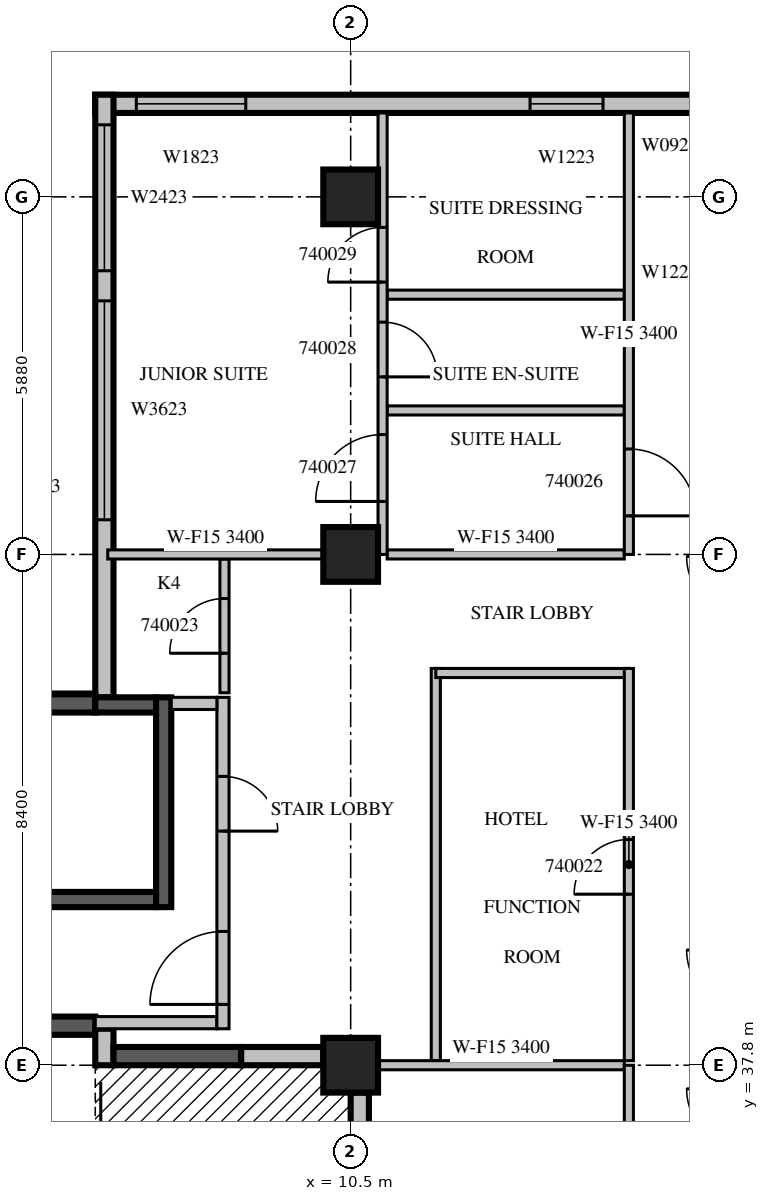
"""IFC4 building model, lengths in metres.
Left out: names, types, materials, properties, quantities, classifications, styles, units other than length and angle.
Written with IfcOpenShell. Run it as: python <this file> out.ifc"""

import sys

from ifc_helpers import new_model, si_unit, direction, frame, frame_2d, origin, origin_2d, place, context, subcontext, project, spatial, rectangle, extrude, source, transform, mapped, element, fill, save


model = new_model("IFC4")
c1 = context("Model", 3, precision=1e-05, world=origin(), true_north=direction((0.0, 1.0)))
c2 = subcontext(c1, "Body", "Model", "MODEL_VIEW")
j1 = project(units=[si_unit("LENGTHUNIT", "METRE"), si_unit("PLANEANGLEUNIT", "RADIAN")], contexts=[c1])
p1 = place(None, origin())
s1 = spatial("IfcSite", under=j1, at=p1, CompositionType="ELEMENT")
p2 = place(p1, origin())
s2 = spatial("IfcBuilding", under=s1, at=p2, CompositionType="ELEMENT")
p3 = place(p2, frame((0.0, 0.0, 185.4)))
s3 = spatial("IfcBuildingStorey", under=s2, at=p3, CompositionType="ELEMENT", Elevation=185.4)
m1 = source(origin(), c2, "Body", "SweptSolid", [
    extrude(rectangle(XDim=0.9, YDim=0.9, at=origin_2d()), origin(), (0.0, 0.0, 1.0), 3.8),
])
for number, where, z_axis, x_axis in (
    (1, (10.5, 37.8, 0.0), (0.0, 0.0, 1.0), (1.0, 0.0, 0.0)),
    (2, (10.5, 46.2, 0.0), (0.0, 0.0, 1.0), (1.0, 0.0, 0.0)),
    (3, (10.5, 52.08, 0.0), (0.0, 0.0, 1.0), (1.0, 0.0, 0.0)),
):
    element("IfcColumn", number, at=place(p3, frame(where, z_axis=z_axis, x_axis=x_axis)), inside=s3, PredefinedType="COLUMN", context=c2, shape_type="MappedRepresentation", body=[
        mapped(m1, transform((0.0, 0.0, 0.0), scale=1.0)),
    ])
m2 = source(origin(), c2, "Body", "SweptSolid", [
    extrude(rectangle(XDim=10.5, YDim=0.3, at=frame_2d((5.25, 0.0))), origin(), (0.0, 0.0, 1.0), 3.4),
])
p4 = place(p3, frame((16.8, 53.61, 0.0), z_axis=(0.0, 0.0, 1.0), x_axis=(-1.0, 0.0, 0.0)))
e4 = element("IfcWall", 4, at=p4, inside=s3, PredefinedType="STANDARD", context=c2, shape_type="MappedRepresentation", body=[
    mapped(m2, transform((0.0, 0.0, 0.0), scale=1.0)),
])
m3 = source(origin(), c2, "Body", "SweptSolid", [
    extrude(rectangle(XDim=1.2, YDim=2.3, at=frame_2d((0.6, 1.15))), frame((0.0, 0.16, 0.0), z_axis=(0.0, -1.0, 0.0), x_axis=(1.0, 0.0, 0.0)), (0.0, 0.0, 1.0), 0.32),
])
p5 = place(p4, frame((2.15, 0.0, 0.6)))
e5 = element("IfcOpeningElement", 5, at=p5, cuts=e4, PredefinedType="OPENING", context=c2, shape_type="MappedRepresentation", body=[
    mapped(m3, transform((0.0, 0.0, 0.0), scale=1.0)),
])
m4 = source(origin(), c2, "Body", "SweptSolid", [
    extrude(rectangle(XDim=1.8, YDim=2.3, at=frame_2d((0.9, 1.15))), frame((0.0, 0.16, 0.0), z_axis=(0.0, -1.0, 0.0), x_axis=(1.0, 0.0, 0.0)), (0.0, 0.0, 1.0), 0.32),
])
p6 = place(p4, frame((8.025, 0.0, 0.6)))
e6 = element("IfcOpeningElement", 6, at=p6, cuts=e4, PredefinedType="OPENING", context=c2, shape_type="MappedRepresentation", body=[
    mapped(m4, transform((0.0, 0.0, 0.0), scale=1.0)),
])
m5 = source(origin(), c2, "Body", "SweptSolid", [
    extrude(rectangle(XDim=9.91, YDim=0.3, at=frame_2d((4.955, 0.0))), origin(), (0.0, 0.0, 1.0), 3.4),
])
p7 = place(p3, frame((6.45, 53.76, 0.0), z_axis=(0.0, 0.0, 1.0), x_axis=(0.0, -1.0, 0.0)))
e7 = element("IfcWall", 7, at=p7, inside=s3, PredefinedType="STANDARD", context=c2, shape_type="MappedRepresentation", body=[
    mapped(m5, transform((0.0, 0.0, 0.0), scale=1.0)),
])
m6 = source(origin(), c2, "Body", "SweptSolid", [
    extrude(rectangle(XDim=3.6, YDim=2.3, at=frame_2d((1.8, 1.15))), frame((0.0, 0.16, 0.0), z_axis=(0.0, -1.0, 0.0), x_axis=(1.0, 0.0, 0.0)), (0.0, 0.0, 1.0), 0.32),
])
p8 = place(p7, frame((3.39, 0.0, 0.6)))
e8 = element("IfcOpeningElement", 8, at=p8, cuts=e7, PredefinedType="OPENING", context=c2, shape_type="MappedRepresentation", body=[
    mapped(m6, transform((0.0, 0.0, 0.0), scale=1.0)),
])
m7 = source(origin(), c2, "Body", "SweptSolid", [
    extrude(rectangle(XDim=2.4, YDim=2.3, at=frame_2d((1.2, 1.15))), frame((0.0, 0.16, 0.0), z_axis=(0.0, -1.0, 0.0), x_axis=(1.0, 0.0, 0.0)), (0.0, 0.0, 1.0), 0.32),
])
p9 = place(p7, frame((0.495, 0.0, 0.6)))
e9 = element("IfcOpeningElement", 9, at=p9, cuts=e7, PredefinedType="OPENING", context=c2, shape_type="MappedRepresentation", body=[
    mapped(m7, transform((0.0, 0.0, 0.0), scale=1.0)),
])
m8 = source(origin(), c2, "Body", "SweptSolid", [
    extrude(rectangle(XDim=6.1, YDim=0.3, at=frame_2d((3.05, 0.0))), origin(), (0.0, 0.0, 1.0), 3.4),
])
for number, where, z_axis, x_axis in (
    (10, (6.3, 43.75, 0.0), (0.0, 0.0, 1.0), (-1.0, 0.0, 0.0)),
    (11, (0.2, 38.45, 0.0), (0.0, 0.0, 1.0), (1.0, 0.0, 0.0)),
):
    element("IfcWall", number, at=place(p3, frame(where, z_axis=z_axis, x_axis=x_axis)), inside=s3, PredefinedType="SOLIDWALL", context=c2, shape_type="MappedRepresentation", body=[
        mapped(m8, transform((0.0, 0.0, 0.0), scale=1.0)),
    ])
m9 = source(origin(), c2, "Body", "SweptSolid", [
    extrude(rectangle(XDim=0.6, YDim=0.3, at=frame_2d((0.3, 0.0))), origin(), (0.0, 0.0, 1.0), 3.4),
])
p10 = place(p3, frame((6.45, 38.4, 0.0), z_axis=(0.0, 0.0, 1.0), x_axis=(0.0, -1.0, 0.0)))
e12 = element("IfcWall", 12, at=p10, inside=s3, PredefinedType="STANDARD", context=c2, shape_type="MappedRepresentation", body=[
    mapped(m9, transform((0.0, 0.0, 0.0), scale=1.0)),
])
p11 = place(p3, frame((6.6, 37.95, 0.0), z_axis=(0.0, 0.0, 1.0), x_axis=(1.0, 0.0, 0.0)))
e13 = element("IfcWall", 13, at=p11, inside=s3, PredefinedType="SOLIDWALL", context=c2, shape_type="SweptSolid", body=[
    extrude(rectangle(XDim=2.1, YDim=0.3, at=frame_2d((1.05, 0.0))), origin(), (0.0, 0.0, 1.0), 3.4),
])
p12 = place(p3, frame((8.7, 37.95, 0.0), z_axis=(0.0, 0.0, 1.0), x_axis=(1.0, 0.0, 0.0)))
e14 = element("IfcWall", 14, at=p12, inside=s3, PredefinedType="STANDARD", context=c2, shape_type="SweptSolid", body=[
    extrude(rectangle(XDim=1.35, YDim=0.3, at=frame_2d((0.675, 0.0))), origin(), (0.0, 0.0, 1.0), 3.4),
])
p13 = place(p3, frame((10.65, 37.35, 0.0), z_axis=(0.0, 0.0, 1.0), x_axis=(0.0, -1.0, 0.0)))
e15 = element("IfcWall", 15, at=p13, inside=s3, PredefinedType="STANDARD", context=c2, shape_type="SweptSolid", body=[
    extrude(rectangle(XDim=7.5, YDim=0.3, at=frame_2d((3.75, 0.0))), origin(), (0.0, 0.0, 1.0), 2.4),
])
m10 = source(origin(), c2, "Body", "SweptSolid", [
    extrude(rectangle(XDim=1.8, YDim=2.4, at=frame_2d((0.9, 1.2))), frame((0.0, 0.16, 0.0), z_axis=(0.0, -1.0, 0.0), x_axis=(1.0, 0.0, 0.0)), (0.0, 0.0, 1.0), 0.32),
])
p14 = place(p13, frame((4.5, 0.0, 0.0)))
e16 = element("IfcOpeningElement", 16, at=p14, cuts=e15, PredefinedType="OPENING", context=c2, shape_type="MappedRepresentation", body=[
    mapped(m10, transform((0.0, 0.0, 0.0), scale=1.0)),
])
m11 = source(origin(), c2, "Body", "SweptSolid", [
    extrude(rectangle(XDim=7.0, YDim=0.25, at=frame_2d((3.5, 0.0))), origin(), (0.0, 0.0, 1.0), 3.4),
])
p15 = place(p3, frame((0.3, 40.525, 0.0), z_axis=(0.0, 0.0, 1.0), x_axis=(1.0, 0.0, 0.0)))
e17 = element("IfcWall", 17, at=p15, inside=s3, PredefinedType="SOLIDWALL", context=c2, shape_type="MappedRepresentation", body=[
    mapped(m11, transform((0.0, 0.0, 0.0), scale=1.0)),
])
m12 = source(origin(), c2, "Body", "SweptSolid", [
    extrude(rectangle(XDim=1.1, YDim=2.1, at=frame_2d((0.55, 1.05))), frame((0.0, 0.135, 0.0), z_axis=(0.0, -1.0, 0.0), x_axis=(1.0, 0.0, 0.0)), (0.0, 0.0, 1.0), 0.27),
])
p16 = place(p15, frame((0.55, 0.0, 0.0)))
e18 = element("IfcOpeningElement", 18, at=p16, cuts=e17, PredefinedType="OPENING", context=c2, shape_type="MappedRepresentation", body=[
    mapped(m12, transform((0.0, 0.0, 0.0), scale=1.0)),
])
m13 = source(origin(), c2, "Body", "SweptSolid", [
    extrude(rectangle(XDim=1.0, YDim=0.25, at=frame_2d((0.5, 0.0))), origin(), (0.0, 0.0, 1.0), 3.4),
])
p17 = place(p3, frame((6.3, 43.725, 0.0), z_axis=(0.0, 0.0, 1.0), x_axis=(1.0, 0.0, 0.0)))
e19 = element("IfcWall", 19, at=p17, inside=s3, PredefinedType="SOLIDWALL", context=c2, shape_type="MappedRepresentation", body=[
    mapped(m13, transform((0.0, 0.0, 0.0), scale=1.0)),
])
m14 = source(origin(), c2, "Body", "SweptSolid", [
    extrude(rectangle(XDim=3.45, YDim=0.25, at=frame_2d((1.725, 0.0))), origin(), (0.0, 0.0, 1.0), 3.4),
])
p18 = place(p3, frame((7.425, 40.4, 0.0), z_axis=(0.0, 0.0, 1.0), x_axis=(0.0, 1.0, 0.0)))
e20 = element("IfcWall", 20, at=p18, inside=s3, PredefinedType="SOLIDWALL", context=c2, shape_type="MappedRepresentation", body=[
    mapped(m14, transform((0.0, 0.0, 0.0), scale=1.0)),
])
m15 = source(origin(), c2, "Body", "SweptSolid", [
    extrude(rectangle(XDim=2.0, YDim=0.2, at=frame_2d((1.0, 0.0))), origin(), (0.0, 0.0, 1.0), 3.4),
])
p19 = place(p3, frame((6.3, 38.5, 0.0), z_axis=(0.0, 0.0, 1.0), x_axis=(1.0, 0.0, 0.0)))
e21 = element("IfcWall", 21, at=p19, inside=s3, PredefinedType="PARTITIONING", context=c2, shape_type="MappedRepresentation", body=[
    mapped(m15, transform((0.0, 0.0, 0.0), scale=1.0)),
])
m16 = source(origin(), c2, "Body", "SweptSolid", [
    extrude(rectangle(XDim=5.45, YDim=0.2, at=frame_2d((2.725, 0.0))), origin(), (0.0, 0.0, 1.0), 3.4),
])
p20 = place(p3, frame((8.4, 38.4, 0.0), z_axis=(0.0, 0.0, 1.0), x_axis=(0.0, 1.0, 0.0)))
e22 = element("IfcWall", 22, at=p20, inside=s3, PredefinedType="PARTITIONING", context=c2, shape_type="MappedRepresentation", body=[
    mapped(m16, transform((0.0, 0.0, 0.0), scale=1.0)),
])
m17 = source(origin(), c2, "Body", "SweptSolid", [
    extrude(rectangle(XDim=1.2, YDim=2.1, at=frame_2d((0.6, 1.05))), frame((0.0, 0.11, 0.0), z_axis=(0.0, -1.0, 0.0), x_axis=(1.0, 0.0, 0.0)), (0.0, 0.0, 1.0), 0.22),
])
p21 = place(p20, frame((0.4, 0.0, 0.0)))
e23 = element("IfcOpeningElement", 23, at=p21, cuts=e22, PredefinedType="OPENING", context=c2, shape_type="MappedRepresentation", body=[
    mapped(m17, transform((0.0, 0.0, 0.0), scale=1.0)),
])
m18 = source(origin(), c2, "Body", "SweptSolid", [
    extrude(rectangle(XDim=0.9, YDim=2.1, at=frame_2d((0.45, 1.05))), frame((0.0, 0.11, 0.0), z_axis=(0.0, -1.0, 0.0), x_axis=(1.0, 0.0, 0.0)), (0.0, 0.0, 1.0), 0.22),
])
p22 = place(p20, frame((3.25, 0.0, 0.0)))
e24 = element("IfcOpeningElement", 24, at=p22, cuts=e22, PredefinedType="OPENING", context=c2, shape_type="MappedRepresentation", body=[
    mapped(m18, transform((0.0, 0.0, 0.0), scale=1.0)),
])
m19 = source(origin(), c2, "Body", "SweptSolid", [
    extrude(rectangle(XDim=0.75, YDim=0.2, at=frame_2d((0.375, 0.0))), origin(), (0.0, 0.0, 1.0), 3.4),
])
p23 = place(p3, frame((7.55, 43.75, 0.0), z_axis=(0.0, 0.0, 1.0), x_axis=(1.0, 0.0, 0.0)))
e25 = element("IfcWall", 25, at=p23, inside=s3, PredefinedType="PARTITIONING", context=c2, shape_type="MappedRepresentation", body=[
    mapped(m19, transform((0.0, 0.0, 0.0), scale=1.0)),
])
m20 = source(origin(), c2, "Body", "SweptSolid", [
    extrude(rectangle(XDim=6.45, YDim=0.15, at=frame_2d((3.225, 0.0))), origin(), (0.0, 0.0, 1.0), 3.4),
])
p24 = place(p3, frame((11.9, 44.325, 0.0), z_axis=(0.0, 0.0, 1.0), x_axis=(0.0, -1.0, 0.0)))
e26 = element("IfcWall", 26, at=p24, inside=s3, PredefinedType="PARTITIONING", context=c2, shape_type="MappedRepresentation", body=[
    mapped(m20, transform((0.0, 0.0, 0.0), scale=1.0)),
])
p25 = place(p3, frame((15.075, 44.25, 0.0), z_axis=(0.0, 0.0, 1.0), x_axis=(-1.0, 0.0, 0.0)))
e27 = element("IfcWall", 27, at=p25, inside=s3, PredefinedType="PARTITIONING", context=c2, shape_type="SweptSolid", body=[
    extrude(rectangle(XDim=3.175, YDim=0.15, at=frame_2d((1.587, 0.0))), origin(), (0.0, 0.0, 1.0), 3.4),
])
p26 = place(p3, frame((15.075, 37.875, 0.0), z_axis=(0.0, 0.0, 1.0), x_axis=(0.0, 1.0, 0.0)))
e28 = element("IfcWall", 28, at=p26, inside=s3, PredefinedType="PARTITIONING", context=c2, shape_type="MappedRepresentation", body=[
    mapped(m20, transform((0.0, 0.0, 0.0), scale=1.0)),
])
m21 = source(origin(), c2, "Body", "SweptSolid", [
    extrude(rectangle(XDim=0.9, YDim=2.1, at=frame_2d((0.45, 1.05))), frame((0.0, 0.085, 0.0), z_axis=(0.0, -1.0, 0.0), x_axis=(1.0, 0.0, 0.0)), (0.0, 0.0, 1.0), 0.17),
])
p27 = place(p26, frame((2.737, 0.0, 0.0)))
e29 = element("IfcOpeningElement", 29, at=p27, cuts=e28, PredefinedType="OPENING", context=c2, shape_type="MappedRepresentation", body=[
    mapped(m21, transform((0.0, 0.0, 0.0), scale=1.0)),
])
m22 = source(origin(), c2, "Body", "SweptSolid", [
    extrude(rectangle(XDim=2.2, YDim=0.15, at=frame_2d((1.1, 0.0))), origin(), (0.0, 0.0, 1.0), 3.4),
])
p28 = place(p3, frame((8.425, 43.925, 0.0), z_axis=(0.0, 0.0, 1.0), x_axis=(0.0, 1.0, 0.0)))
e30 = element("IfcWall", 30, at=p28, inside=s3, PredefinedType="PARTITIONING", context=c2, shape_type="MappedRepresentation", body=[
    mapped(m22, transform((0.0, 0.0, 0.0), scale=1.0)),
])
p29 = place(p28, frame((0.65, 0.0, 0.0)))
e31 = element("IfcOpeningElement", 31, at=p29, cuts=e30, PredefinedType="OPENING", context=c2, shape_type="MappedRepresentation", body=[
    mapped(m21, transform((0.0, 0.0, 0.0), scale=1.0)),
])
m23 = source(origin(), c2, "Body", "SweptSolid", [
    extrude(rectangle(XDim=4.051, YDim=0.15, at=frame_2d((2.026, 0.0))), origin(), (0.0, 0.0, 1.0), 3.4),
])
p30 = place(p3, frame((15.0, 37.8, 0.0), z_axis=(0.0, 0.0, 1.0), x_axis=(-1.0, 0.0, 0.0)))
e32 = element("IfcWall", 32, at=p30, inside=s3, PredefinedType="PARTITIONING", context=c2, shape_type="MappedRepresentation", body=[
    mapped(m23, transform((0.0, 0.0, 0.0), scale=1.0)),
])
m24 = source(origin(), c2, "Body", "SweptSolid", [
    extrude(rectangle(XDim=3.9, YDim=0.15, at=frame_2d((1.95, 0.0))), origin(), (0.0, 0.0, 1.0), 3.4),
])
for number, where, z_axis, x_axis in (
    (33, (15.0, 48.568, 0.0), (0.0, 0.0, 1.0), (-1.0, 0.0, 0.0)),
    (34, (15.0, 50.472, 0.0), (0.0, 0.0, 1.0), (-1.0, 0.0, 0.0)),
):
    element("IfcWall", number, at=place(p3, frame(where, z_axis=z_axis, x_axis=x_axis)), inside=s3, PredefinedType="PARTITIONING", context=c2, shape_type="MappedRepresentation", body=[
        mapped(m24, transform((0.0, 0.0, 0.0), scale=1.0)),
    ])
m25 = source(origin(), c2, "Body", "SweptSolid", [
    extrude(rectangle(XDim=3.546, YDim=0.15, at=frame_2d((1.773, 0.0))), origin(), (0.0, 0.0, 1.0), 3.4),
])
p31 = place(p3, frame((10.051, 46.2, 0.0), z_axis=(0.0, 0.0, 1.0), x_axis=(-1.0, 0.0, 0.0)))
e35 = element("IfcWall", 35, at=p31, inside=s3, PredefinedType="PARTITIONING", context=c2, shape_type="MappedRepresentation", body=[
    mapped(m25, transform((0.0, 0.0, 0.0), scale=1.0)),
])
p32 = place(p3, frame((15.0, 46.2, 0.0), z_axis=(0.0, 0.0, 1.0), x_axis=(-1.0, 0.0, 0.0)))
e36 = element("IfcWall", 36, at=p32, inside=s3, PredefinedType="PARTITIONING", context=c2, shape_type="MappedRepresentation", body=[
    mapped(m24, transform((0.0, 0.0, 0.0), scale=1.0)),
])
m26 = source(origin(), c2, "Body", "SweptSolid", [
    extrude(rectangle(XDim=7.26, YDim=0.15, at=frame_2d((3.63, 0.0))), origin(), (0.0, 0.0, 1.0), 3.4),
])
p33 = place(p3, frame((11.025, 46.2, 0.0), z_axis=(0.0, 0.0, 1.0), x_axis=(0.0, 1.0, 0.0)))
e37 = element("IfcWall", 37, at=p33, inside=s3, PredefinedType="PARTITIONING", context=c2, shape_type="MappedRepresentation", body=[
    mapped(m26, transform((0.0, 0.0, 0.0), scale=1.0)),
])
m27 = source(origin(), c2, "Body", "SweptSolid", [
    extrude(rectangle(XDim=1.1, YDim=2.1, at=frame_2d((0.55, 1.05))), frame((0.0, 0.085, 0.0), z_axis=(0.0, -1.0, 0.0), x_axis=(1.0, 0.0, 0.0)), (0.0, 0.0, 1.0), 0.17),
])
p34 = place(p33, frame((0.872, 0.0, 0.0)))
e38 = element("IfcOpeningElement", 38, at=p34, cuts=e37, PredefinedType="OPENING", context=c2, shape_type="MappedRepresentation", body=[
    mapped(m27, transform((0.0, 0.0, 0.0), scale=1.0)),
])
p35 = place(p33, frame((2.92, 0.0, 0.0)))
e39 = element("IfcOpeningElement", 39, at=p35, cuts=e37, PredefinedType="OPENING", context=c2, shape_type="MappedRepresentation", body=[
    mapped(m21, transform((0.0, 0.0, 0.0), scale=1.0)),
])
p36 = place(p33, frame((4.478, 0.0, 0.0)))
e40 = element("IfcOpeningElement", 40, at=p36, cuts=e37, PredefinedType="OPENING", context=c2, shape_type="MappedRepresentation", body=[
    mapped(m21, transform((0.0, 0.0, 0.0), scale=1.0)),
])
p37 = place(p3, frame((15.075, 29.4, 0.0), z_axis=(0.0, 0.0, 1.0), x_axis=(0.0, 1.0, 0.0)))
e41 = element("IfcWall", 41, at=p37, inside=s3, PredefinedType="PARTITIONING", context=c2, shape_type="SweptSolid", body=[
    extrude(rectangle(XDim=8.4, YDim=0.15, at=frame_2d((4.2, 0.0))), origin(), (0.0, 0.0, 1.0), 2.9),
])
m28 = source(origin(), c2, "Body", "SweptSolid", [
    extrude(rectangle(XDim=1.6, YDim=2.1, at=frame_2d((0.8, 1.05))), frame((0.0, 0.085, 0.0), z_axis=(0.0, -1.0, 0.0), x_axis=(1.0, 0.0, 0.0)), (0.0, 0.0, 1.0), 0.17),
])
p38 = place(p37, frame((1.211, 0.0, 0.0)))
e42 = element("IfcOpeningElement", 42, at=p38, cuts=e41, PredefinedType="OPENING", context=c2, shape_type="MappedRepresentation", body=[
    mapped(m28, transform((0.0, 0.0, 0.0), scale=1.0)),
])
p39 = place(p37, frame((4.678, 0.0, 0.0)))
e43 = element("IfcOpeningElement", 43, at=p39, cuts=e41, PredefinedType="OPENING", context=c2, shape_type="MappedRepresentation", body=[
    mapped(m21, transform((0.0, 0.0, 0.0), scale=1.0)),
])
p40 = place(p3, frame((15.075, 46.2, 0.0), z_axis=(0.0, 0.0, 1.0), x_axis=(0.0, 1.0, 0.0)))
e44 = element("IfcWall", 44, at=p40, inside=s3, PredefinedType="PARTITIONING", context=c2, shape_type="MappedRepresentation", body=[
    mapped(m26, transform((0.0, 0.0, 0.0), scale=1.0)),
])
p41 = place(p40, frame((0.634, 0.0, 0.0)))
e45 = element("IfcOpeningElement", 45, at=p41, cuts=e44, PredefinedType="OPENING", context=c2, shape_type="MappedRepresentation", body=[
    mapped(m27, transform((0.0, 0.0, 0.0), scale=1.0)),
])
m29 = source(origin(), c2, "Body", "SweptSolid", [
    extrude(rectangle(XDim=1.2, YDim=2.3, at=frame_2d((0.6, 1.15))), frame((0.0, 0.03, 0.0), z_axis=(0.0, -1.0, 0.0), x_axis=(1.0, 0.0, 0.0)), (0.0, 0.0, 1.0), 0.06),
])
p42 = place(p5, origin())
e46 = element("IfcWindow", 46, at=p42, inside=s3, PartitioningType="SINGLE_PANEL", PredefinedType="WINDOW", context=c2, shape_type="MappedRepresentation", body=[
    mapped(m29, transform((0.0, 0.0, 0.0), scale=1.0)),
])
fill(e5, e46)
m30 = source(origin(), c2, "Body", "SweptSolid", [
    extrude(rectangle(XDim=1.8, YDim=2.3, at=frame_2d((0.9, 1.15))), frame((0.0, 0.03, 0.0), z_axis=(0.0, -1.0, 0.0), x_axis=(1.0, 0.0, 0.0)), (0.0, 0.0, 1.0), 0.06),
])
p43 = place(p6, origin())
e47 = element("IfcWindow", 47, at=p43, inside=s3, PartitioningType="SINGLE_PANEL", PredefinedType="WINDOW", context=c2, shape_type="MappedRepresentation", body=[
    mapped(m30, transform((0.0, 0.0, 0.0), scale=1.0)),
])
fill(e6, e47)
m31 = source(origin(), c2, "Body", "SweptSolid", [
    extrude(rectangle(XDim=3.6, YDim=2.3, at=frame_2d((1.8, 1.15))), frame((0.0, 0.03, 0.0), z_axis=(0.0, -1.0, 0.0), x_axis=(1.0, 0.0, 0.0)), (0.0, 0.0, 1.0), 0.06),
])
p44 = place(p8, origin())
e48 = element("IfcWindow", 48, at=p44, inside=s3, PartitioningType="SINGLE_PANEL", PredefinedType="WINDOW", context=c2, shape_type="MappedRepresentation", body=[
    mapped(m31, transform((0.0, 0.0, 0.0), scale=1.0)),
])
fill(e8, e48)
m32 = source(origin(), c2, "Body", "SweptSolid", [
    extrude(rectangle(XDim=2.4, YDim=2.3, at=frame_2d((1.2, 1.15))), frame((0.0, 0.03, 0.0), z_axis=(0.0, -1.0, 0.0), x_axis=(1.0, 0.0, 0.0)), (0.0, 0.0, 1.0), 0.06),
])
p45 = place(p9, origin())
e49 = element("IfcWindow", 49, at=p45, inside=s3, PartitioningType="SINGLE_PANEL", PredefinedType="WINDOW", context=c2, shape_type="MappedRepresentation", body=[
    mapped(m32, transform((0.0, 0.0, 0.0), scale=1.0)),
])
fill(e9, e49)
m33 = source(origin(), c2, "Body", "SweptSolid", [
    extrude(rectangle(XDim=1.2, YDim=2.1, at=frame_2d((0.6, 1.05))), frame((0.0, 0.025, 0.0), z_axis=(0.0, -1.0, 0.0), x_axis=(1.0, 0.0, 0.0)), (0.0, 0.0, 1.0), 0.05),
])
p46 = place(p21, origin())
e50 = element("IfcDoor", 50, at=p46, inside=s3, OperationType="SINGLE_SWING_LEFT", PredefinedType="DOOR", context=c2, shape_type="MappedRepresentation", body=[
    mapped(m33, transform((0.0, 0.0, 0.0), scale=1.0)),
])
fill(e23, e50)
m34 = source(origin(), c2, "Body", "SweptSolid", [
    extrude(rectangle(XDim=0.9, YDim=2.1, at=frame_2d((0.45, 1.05))), frame((0.0, 0.025, 0.0), z_axis=(0.0, -1.0, 0.0), x_axis=(1.0, 0.0, 0.0)), (0.0, 0.0, 1.0), 0.05),
])
p47 = place(p22, origin())
e51 = element("IfcDoor", 51, at=p47, inside=s3, OperationType="SINGLE_SWING_RIGHT", PredefinedType="DOOR", context=c2, shape_type="MappedRepresentation", body=[
    mapped(m34, transform((0.0, 0.0, 0.0), scale=1.0)),
])
fill(e24, e51)
p48 = place(p27, origin())
e52 = element("IfcDoor", 52, at=p48, inside=s3, OperationType="SINGLE_SWING_LEFT", PredefinedType="DOOR", context=c2, shape_type="MappedRepresentation", body=[
    mapped(m34, transform((0.0, 0.0, 0.0), scale=1.0)),
])
fill(e29, e52)
p49 = place(p29, origin())
e53 = element("IfcDoor", 53, at=p49, inside=s3, OperationType="SINGLE_SWING_LEFT", PredefinedType="DOOR", context=c2, shape_type="MappedRepresentation", body=[
    mapped(m34, transform((0.0, 0.0, 0.0), scale=1.0)),
])
fill(e31, e53)
m35 = source(origin(), c2, "Body", "SweptSolid", [
    extrude(rectangle(XDim=1.1, YDim=2.1, at=frame_2d((0.55, 1.05))), frame((0.0, 0.025, 0.0), z_axis=(0.0, -1.0, 0.0), x_axis=(1.0, 0.0, 0.0)), (0.0, 0.0, 1.0), 0.05),
])
p50 = place(p41, origin())
e54 = element("IfcDoor", 54, at=p50, inside=s3, OperationType="SINGLE_SWING_RIGHT", PredefinedType="DOOR", context=c2, shape_type="MappedRepresentation", body=[
    mapped(m35, transform((0.0, 0.0, 0.0), scale=1.0)),
])
fill(e45, e54)
p51 = place(p34, origin())
e55 = element("IfcDoor", 55, at=p51, inside=s3, OperationType="SINGLE_SWING_LEFT", PredefinedType="DOOR", context=c2, shape_type="MappedRepresentation", body=[
    mapped(m35, transform((0.0, 0.0, 0.0), scale=1.0)),
])
fill(e38, e55)
p52 = place(p35, origin())
e56 = element("IfcDoor", 56, at=p52, inside=s3, OperationType="SINGLE_SWING_RIGHT", PredefinedType="DOOR", context=c2, shape_type="MappedRepresentation", body=[
    mapped(m34, transform((0.0, 0.0, 0.0), scale=1.0)),
])
fill(e39, e56)
p53 = place(p36, origin())
e57 = element("IfcDoor", 57, at=p53, inside=s3, OperationType="SINGLE_SWING_LEFT", PredefinedType="DOOR", context=c2, shape_type="MappedRepresentation", body=[
    mapped(m34, transform((0.0, 0.0, 0.0), scale=1.0)),
])
fill(e40, e57)
save(model, sys.argv[1])
